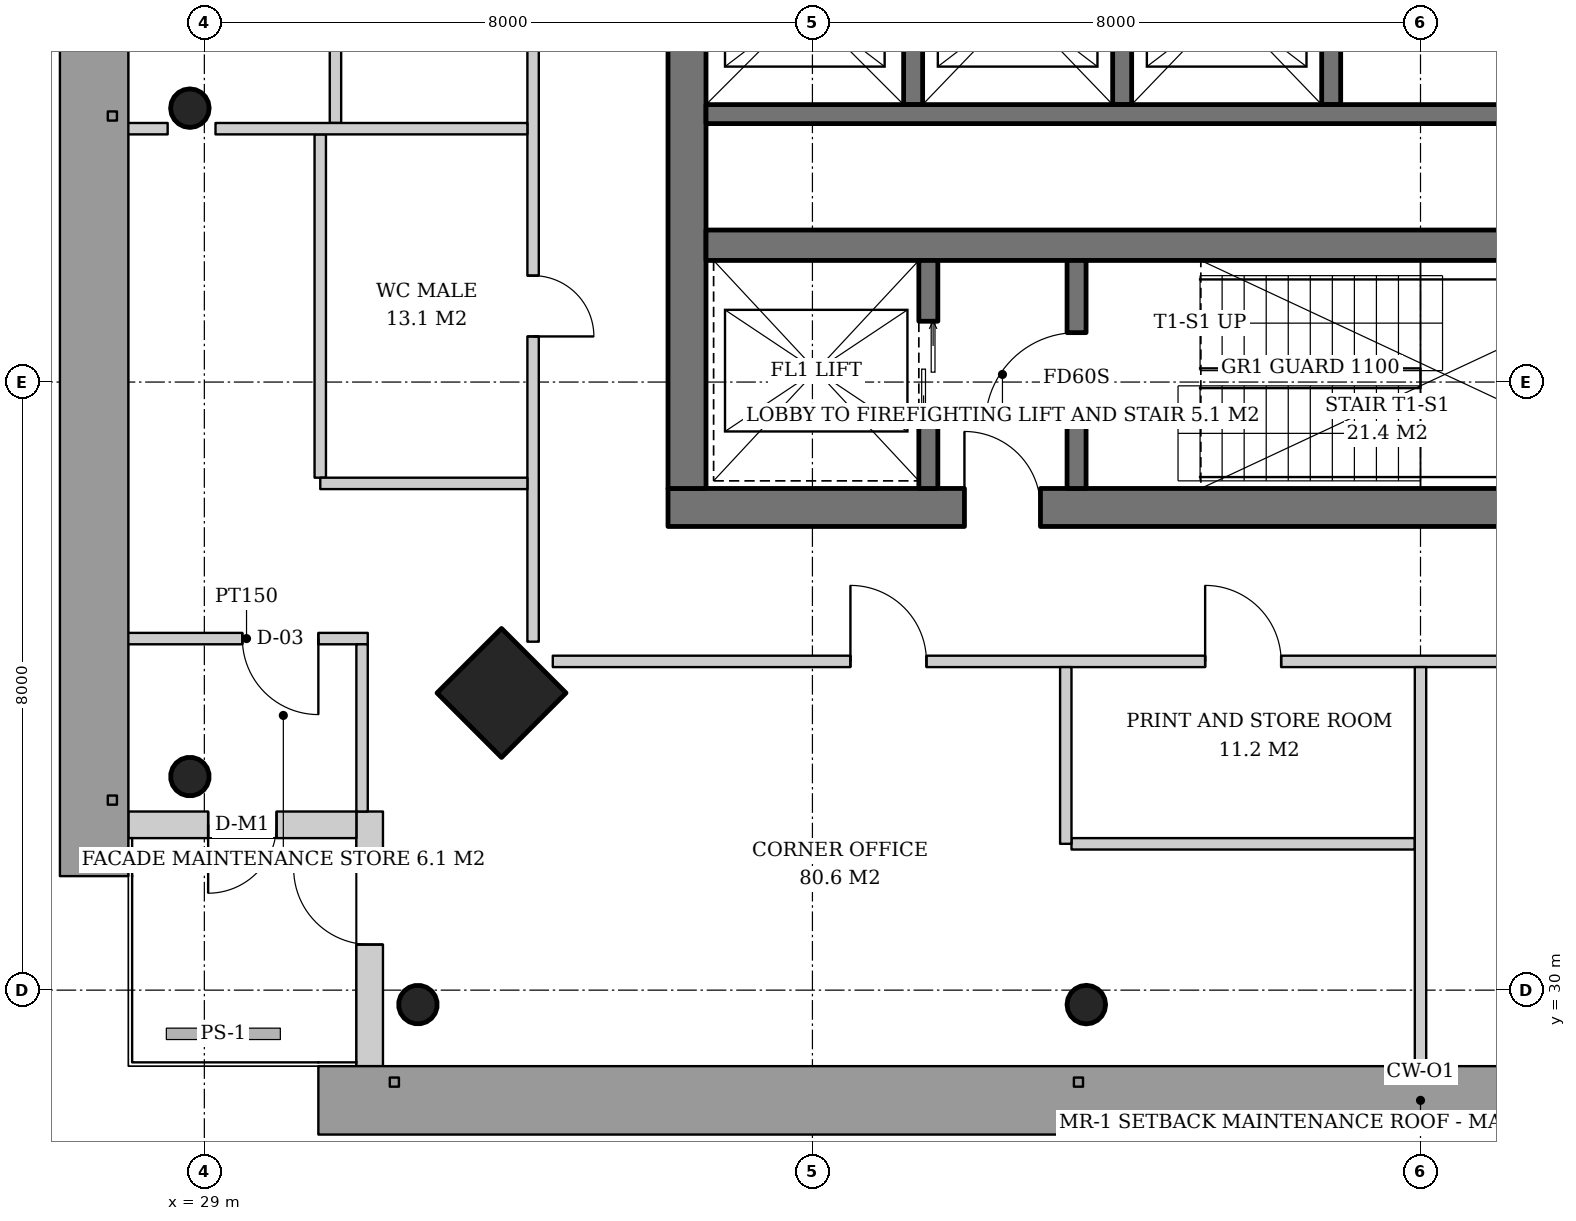
"""IFC4 building model, lengths in metres.
Left out: names, types, materials, properties, quantities, classifications, styles, units other than length and angle.
Written with IfcOpenShell. Run it as: python <this file> out.ifc"""

import sys

from ifc_helpers import new_model, si_unit, direction, frame, frame_2d, origin, origin_2d, place, context, subcontext, project, spatial, rectangle, hollow_circle, extrude, element, fill, save


model = new_model("IFC4")
c1 = context("Model", 3, precision=1e-05, world=origin(), true_north=direction((0.0, 1.0)))
c2 = subcontext(c1, "Body", "Model", "MODEL_VIEW")
j1 = project(units=[si_unit("LENGTHUNIT", "METRE"), si_unit("PLANEANGLEUNIT", "RADIAN")], contexts=[c1])
p1 = place(None, origin())
s1 = spatial("IfcSite", under=j1, at=p1, CompositionType="ELEMENT")
p2 = place(p1, origin())
s2 = spatial("IfcBuilding", under=s1, at=p2, CompositionType="ELEMENT")
p3 = place(p2, frame((0.0, 0.0, 264.2)))
s3 = spatial("IfcBuildingStorey", under=s2, at=p3, CompositionType="ELEMENT", Elevation=264.2)
p4 = place(p3, frame((32.871, 33.871, 0.0), z_axis=(0.031962158256, 0.031962158256, 0.998977898093), x_axis=(-0.707106781187, 0.707106781187, 0.0)))
e1 = element("IfcColumn", 1, at=p4, inside=s3, PredefinedType="COLUMN", context=c2, shape_type="SweptSolid", body=[
    extrude(rectangle(XDim=1.2, YDim=1.2, at=origin_2d()), origin(), (0.0, 0.0, 1.0), 3.804),
])
p5 = place(p3, frame((28.771, 32.771, 0.0), z_axis=(0.031898107953, 0.031898107953, 0.998981992539), x_axis=(-0.707106781187, 0.707106781187, 0.0)))
e2 = element("IfcColumn", 2, at=p5, inside=s3, PredefinedType="COLUMN", context=c2, shape_type="SweptSolid", body=[
    extrude(hollow_circle(Radius=0.254, WallThickness=0.02, at=origin_2d()), origin(), (0.0, 0.0, 1.0), 3.804),
])
p6 = place(p3, frame((28.771, 41.591, 0.0), z_axis=(0.031912557129, 0.010594712125, 0.999434510497), x_axis=(-0.315081783451, 0.949064523485, 0.0)))
e3 = element("IfcColumn", 3, at=p6, inside=s3, PredefinedType="COLUMN", context=c2, shape_type="SweptSolid", body=[
    extrude(hollow_circle(Radius=0.254, WallThickness=0.02, at=origin_2d()), origin(), (0.0, 0.0, 1.0), 3.802),
])
p7 = place(p3, frame((31.771, 29.771, 0.0), z_axis=(0.031898107953, 0.031898107953, 0.998981992539), x_axis=(-0.707106781187, 0.707106781187, 0.0)))
e4 = element("IfcColumn", 4, at=p7, inside=s3, PredefinedType="COLUMN", context=c2, shape_type="SweptSolid", body=[
    extrude(hollow_circle(Radius=0.254, WallThickness=0.02, at=origin_2d()), origin(), (0.0, 0.0, 1.0), 3.804),
])
p8 = place(p3, frame((40.591, 29.771, 0.0), z_axis=(0.010594712125, 0.031912557129, 0.999434510497), x_axis=(-0.949064523485, 0.315081783451, 0.0)))
e5 = element("IfcColumn", 5, at=p8, inside=s3, PredefinedType="COLUMN", context=c2, shape_type="SweptSolid", body=[
    extrude(hollow_circle(Radius=0.254, WallThickness=0.02, at=origin_2d()), origin(), (0.0, 0.0, 1.0), 3.802),
])
p9 = place(p3, frame((35.1, 36.35, 0.0), z_axis=(0.0, 0.0, 1.0), x_axis=(1.0, 0.0, 0.0)))
e6 = element("IfcWall", 6, at=p9, inside=s3, PredefinedType="SHEAR", context=c2, shape_type="SweptSolid", body=[
    extrude(rectangle(XDim=19.8, YDim=0.5, at=frame_2d((9.9, 0.0))), origin(), (0.0, 0.0, 1.0), 3.8),
])
p10 = place(p9, frame((3.9, 0.0, 0.0)))
e7 = element("IfcOpeningElement", 7, at=p10, cuts=e6, PredefinedType="OPENING", context=c2, shape_type="SweptSolid", body=[
    extrude(rectangle(XDim=1.0, YDim=2.1, at=frame_2d((0.5, 1.05))), frame((0.0, 0.26, 0.0), z_axis=(0.0, -1.0, 0.0), x_axis=(1.0, 0.0, 0.0)), (0.0, 0.0, 1.0), 0.52),
])
p11 = place(p9, frame((15.35, 0.0, 0.0)))
e8 = element("IfcOpeningElement", 8, at=p11, cuts=e6, PredefinedType="OPENING", context=c2, shape_type="SweptSolid", body=[
    extrude(rectangle(XDim=1.0, YDim=2.1, at=frame_2d((0.5, 1.05))), frame((0.0, 0.26, 0.0), z_axis=(0.0, -1.0, 0.0), x_axis=(1.0, 0.0, 0.0)), (0.0, 0.0, 1.0), 0.52),
])
p12 = place(p3, frame((35.35, 36.6, 0.0), z_axis=(0.0, 0.0, 1.0), x_axis=(0.0, 1.0, 0.0)))
e9 = element("IfcWall", 9, at=p12, inside=s3, PredefinedType="SHEAR", context=c2, shape_type="SweptSolid", body=[
    extrude(rectangle(XDim=18.8, YDim=0.5, at=frame_2d((9.4, 0.0))), origin(), (0.0, 0.0, 1.0), 3.8),
])
p13 = place(p12, frame((8.5, 0.0, 0.0)))
e10 = element("IfcOpeningElement", 10, at=p13, cuts=e9, PredefinedType="OPENING", context=c2, shape_type="SweptSolid", body=[
    extrude(rectangle(XDim=1.8, YDim=2.4, at=frame_2d((0.9, 1.2))), frame((0.0, 0.26, 0.0), z_axis=(0.0, -1.0, 0.0), x_axis=(1.0, 0.0, 0.0)), (0.0, 0.0, 1.0), 0.52),
])
p14 = place(p3, frame((35.6, 39.8, 0.0), z_axis=(0.0, 0.0, 1.0), x_axis=(1.0, 0.0, 0.0)))
e11 = element("IfcWall", 11, at=p14, inside=s3, PredefinedType="SHEAR", context=c2, shape_type="SweptSolid", body=[
    extrude(rectangle(XDim=18.8, YDim=0.4, at=frame_2d((9.4, 0.0))), origin(), (0.0, 0.0, 1.0), 3.8),
])
p15 = place(p3, frame((31.175, 29.0, 0.0), z_axis=(0.0, 0.0, 1.0), x_axis=(0.0, 1.0, 0.0)))
e12 = element("IfcWall", 12, at=p15, inside=s3, PredefinedType="SOLIDWALL", context=c2, shape_type="SweptSolid", body=[
    extrude(rectangle(XDim=3.35, YDim=0.35, at=frame_2d((1.675, 0.0))), origin(), (0.0, 0.0, 1.0), 3.62),
])
p16 = place(p15, frame((1.6, 0.0, 0.0)))
e13 = element("IfcOpeningElement", 13, at=p16, cuts=e12, PredefinedType="OPENING", context=c2, shape_type="SweptSolid", body=[
    extrude(rectangle(XDim=1.0, YDim=2.4, at=frame_2d((0.5, 1.2))), frame((0.0, 0.185, 0.0), z_axis=(0.0, -1.0, 0.0), x_axis=(1.0, 0.0, 0.0)), (0.0, 0.0, 1.0), 0.37),
])
p17 = place(p3, frame((31.0, 32.175, 0.0), z_axis=(0.0, 0.0, 1.0), x_axis=(-1.0, 0.0, 0.0)))
e14 = element("IfcWall", 14, at=p17, inside=s3, PredefinedType="SOLIDWALL", context=c2, shape_type="SweptSolid", body=[
    extrude(rectangle(XDim=3.0, YDim=0.35, at=frame_2d((1.5, 0.0))), origin(), (0.0, 0.0, 1.0), 3.62),
])
p18 = place(p17, frame((1.05, 0.0, 0.0)))
e15 = element("IfcOpeningElement", 15, at=p18, cuts=e14, PredefinedType="OPENING", context=c2, shape_type="SweptSolid", body=[
    extrude(rectangle(XDim=0.9, YDim=2.1, at=frame_2d((0.45, 1.05))), frame((0.0, 0.185, 0.0), z_axis=(0.0, -1.0, 0.0), x_axis=(1.0, 0.0, 0.0)), (0.0, 0.0, 1.0), 0.37),
])
p19 = place(p3, frame((38.525, 36.6, 0.0), z_axis=(0.0, 0.0, 1.0), x_axis=(0.0, 1.0, 0.0)))
e16 = element("IfcWall", 16, at=p19, inside=s3, PredefinedType="SHEAR", context=c2, shape_type="SweptSolid", body=[
    extrude(rectangle(XDim=3.0, YDim=0.25, at=frame_2d((1.5, 0.0))), origin(), (0.0, 0.0, 1.0), 3.8),
])
p20 = place(p19, frame((0.9, 0.0, 0.0)))
e17 = element("IfcOpeningElement", 17, at=p20, cuts=e16, PredefinedType="OPENING", context=c2, shape_type="SweptSolid", body=[
    extrude(rectangle(XDim=1.3, YDim=2.2, at=frame_2d((0.65, 1.1))), frame((0.0, 0.135, 0.0), z_axis=(0.0, -1.0, 0.0), x_axis=(1.0, 0.0, 0.0)), (0.0, 0.0, 1.0), 0.27),
])
p21 = place(p3, frame((40.475, 36.6, 0.0), z_axis=(0.0, 0.0, 1.0), x_axis=(0.0, 1.0, 0.0)))
e18 = element("IfcWall", 18, at=p21, inside=s3, PredefinedType="SHEAR", context=c2, shape_type="SweptSolid", body=[
    extrude(rectangle(XDim=3.0, YDim=0.25, at=frame_2d((1.5, 0.0))), origin(), (0.0, 0.0, 1.0), 3.8),
])
p22 = place(p21, frame((0.85, 0.0, 0.0)))
e19 = element("IfcOpeningElement", 19, at=p22, cuts=e18, PredefinedType="OPENING", context=c2, shape_type="SweptSolid", body=[
    extrude(rectangle(XDim=1.2, YDim=2.1, at=frame_2d((0.6, 1.05))), frame((0.0, 0.135, 0.0), z_axis=(0.0, -1.0, 0.0), x_axis=(1.0, 0.0, 0.0)), (0.0, 0.0, 1.0), 0.27),
])
for number, where, z_axis, x_axis in (
    (20, (38.325, 44.25, 0.0), (0.0, 0.0, 1.0), (0.0, -1.0, 0.0)),
    (21, (41.075, 44.25, 0.0), (0.0, 0.0, 1.0), (0.0, -1.0, 0.0)),
    (22, (43.825, 44.25, 0.0), (0.0, 0.0, 1.0), (0.0, -1.0, 0.0)),
):
    element("IfcWall", number, at=place(p3, frame(where, z_axis=z_axis, x_axis=x_axis)), inside=s3, PredefinedType="SHEAR", context=c2, shape_type="SweptSolid", body=[
        extrude(rectangle(XDim=2.6, YDim=0.25, at=frame_2d((1.3, 0.0))), origin(), (0.0, 0.0, 1.0), 3.8),
    ])
p23 = place(p3, frame((35.6, 41.525, 0.0), z_axis=(0.0, 0.0, 1.0), x_axis=(1.0, 0.0, 0.0)))
e23 = element("IfcWall", 23, at=p23, inside=s3, PredefinedType="SHEAR", context=c2, shape_type="SweptSolid", body=[
    extrude(rectangle(XDim=11.1, YDim=0.25, at=frame_2d((5.55, 0.0))), origin(), (0.0, 0.0, 1.0), 3.8),
])
for number, where, z_axis, x_axis in (
    (24, (30.725, 45.925, 0.0), (0.0, 0.0, 1.0), (0.0, -1.0, 0.0)),
    (25, (30.525, 41.258, 0.0), (0.0, 0.0, 1.0), (0.0, -1.0, 0.0)),
):
    element("IfcWall", number, at=place(p3, frame(where, z_axis=z_axis, x_axis=x_axis)), inside=s3, PredefinedType="PARTITIONING", context=c2, shape_type="SweptSolid", body=[
        extrude(rectangle(XDim=4.517, YDim=0.15, at=frame_2d((2.258, 0.0))), origin(), (0.0, 0.0, 1.0), 3.12),
    ])
p24 = place(p3, frame((33.325, 57.416, 0.0), z_axis=(0.0, 0.0, 1.0), x_axis=(0.0, -1.0, 0.0)))
e26 = element("IfcWall", 26, at=p24, inside=s3, PredefinedType="PARTITIONING", context=c2, shape_type="SweptSolid", body=[
    extrude(rectangle(XDim=22.832, YDim=0.15, at=frame_2d((11.416, 0.0))), origin(), (0.0, 0.0, 1.0), 3.02),
])
p25 = place(p24, frame((3.916, 0.0, 0.0)))
e27 = element("IfcOpeningElement", 27, at=p25, cuts=e26, PredefinedType="OPENING", context=c2, shape_type="SweptSolid", body=[
    extrude(rectangle(XDim=1.0, YDim=2.1, at=frame_2d((0.5, 1.05))), frame((0.0, 0.085, 0.0), z_axis=(0.0, -1.0, 0.0), x_axis=(1.0, 0.0, 0.0)), (0.0, 0.0, 1.0), 0.17),
])
p26 = place(p24, frame((8.682, 0.0, 0.0)))
e28 = element("IfcOpeningElement", 28, at=p26, cuts=e26, PredefinedType="OPENING", context=c2, shape_type="SweptSolid", body=[
    extrude(rectangle(XDim=0.8, YDim=2.1, at=frame_2d((0.4, 1.05))), frame((0.0, 0.085, 0.0), z_axis=(0.0, -1.0, 0.0), x_axis=(1.0, 0.0, 0.0)), (0.0, 0.0, 1.0), 0.17),
])
p27 = place(p24, frame((13.249, 0.0, 0.0)))
e29 = element("IfcOpeningElement", 29, at=p27, cuts=e26, PredefinedType="OPENING", context=c2, shape_type="SweptSolid", body=[
    extrude(rectangle(XDim=1.0, YDim=2.1, at=frame_2d((0.5, 1.05))), frame((0.0, 0.085, 0.0), z_axis=(0.0, -1.0, 0.0), x_axis=(1.0, 0.0, 0.0)), (0.0, 0.0, 1.0), 0.17),
])
p28 = place(p24, frame((18.016, 0.0, 0.0)))
e30 = element("IfcOpeningElement", 30, at=p28, cuts=e26, PredefinedType="OPENING", context=c2, shape_type="SweptSolid", body=[
    extrude(rectangle(XDim=0.8, YDim=2.1, at=frame_2d((0.4, 1.05))), frame((0.0, 0.085, 0.0), z_axis=(0.0, -1.0, 0.0), x_axis=(1.0, 0.0, 0.0)), (0.0, 0.0, 1.0), 0.17),
])
p29 = place(p3, frame((33.25, 41.333, 0.0), z_axis=(0.0, 0.0, 1.0), x_axis=(-1.0, 0.0, 0.0)))
e31 = element("IfcWall", 31, at=p29, inside=s3, PredefinedType="PARTITIONING", context=c2, shape_type="SweptSolid", body=[
    extrude(rectangle(XDim=4.103, YDim=0.15, at=frame_2d((2.052, 0.0))), origin(), (0.0, 0.0, 1.0), 3.62),
])
p30 = place(p3, frame((28.517, 41.333, 0.0), z_axis=(0.0, 0.0, 1.0), x_axis=(-1.0, 0.0, 0.0)))
e32 = element("IfcWall", 32, at=p30, inside=s3, PredefinedType="PARTITIONING", context=c2, shape_type="SweptSolid", body=[
    extrude(rectangle(XDim=0.557, YDim=0.15, at=frame_2d((0.279, 0.0))), origin(), (0.0, 0.0, 1.0), 3.62),
])
p31 = place(p3, frame((33.25, 36.667, 0.0), z_axis=(0.0, 0.0, 1.0), x_axis=(-1.0, 0.0, 0.0)))
e33 = element("IfcWall", 33, at=p31, inside=s3, PredefinedType="PARTITIONING", context=c2, shape_type="SweptSolid", body=[
    extrude(rectangle(XDim=2.725, YDim=0.15, at=frame_2d((1.363, 0.0))), origin(), (0.0, 0.0, 1.0), 3.62),
])
p32 = place(p3, frame((40.408, 31.925, 0.0), z_axis=(0.0, 0.0, 1.0), x_axis=(1.0, 0.0, 0.0)))
e34 = element("IfcWall", 34, at=p32, inside=s3, PredefinedType="PARTITIONING", context=c2, shape_type="SweptSolid", body=[
    extrude(rectangle(XDim=4.517, YDim=0.15, at=frame_2d((2.258, 0.0))), origin(), (0.0, 0.0, 1.0), 3.12),
])
p33 = place(p3, frame((33.584, 34.325, 0.0), z_axis=(0.0, 0.0, 1.0), x_axis=(1.0, 0.0, 0.0)))
e35 = element("IfcWall", 35, at=p33, inside=s3, PredefinedType="PARTITIONING", context=c2, shape_type="SweptSolid", body=[
    extrude(rectangle(XDim=22.832, YDim=0.15, at=frame_2d((11.416, 0.0))), origin(), (0.0, 0.0, 1.0), 3.02),
])
p34 = place(p33, frame((3.916, 0.0, 0.0)))
e36 = element("IfcOpeningElement", 36, at=p34, cuts=e35, PredefinedType="OPENING", context=c2, shape_type="SweptSolid", body=[
    extrude(rectangle(XDim=1.0, YDim=2.1, at=frame_2d((0.5, 1.05))), frame((0.0, 0.085, 0.0), z_axis=(0.0, -1.0, 0.0), x_axis=(1.0, 0.0, 0.0)), (0.0, 0.0, 1.0), 0.17),
])
p35 = place(p33, frame((8.583, 0.0, 0.0)))
e37 = element("IfcOpeningElement", 37, at=p35, cuts=e35, PredefinedType="OPENING", context=c2, shape_type="SweptSolid", body=[
    extrude(rectangle(XDim=1.0, YDim=2.1, at=frame_2d((0.5, 1.05))), frame((0.0, 0.085, 0.0), z_axis=(0.0, -1.0, 0.0), x_axis=(1.0, 0.0, 0.0)), (0.0, 0.0, 1.0), 0.17),
])
p36 = place(p33, frame((13.249, 0.0, 0.0)))
e38 = element("IfcOpeningElement", 38, at=p36, cuts=e35, PredefinedType="OPENING", context=c2, shape_type="SweptSolid", body=[
    extrude(rectangle(XDim=1.0, YDim=2.1, at=frame_2d((0.5, 1.05))), frame((0.0, 0.085, 0.0), z_axis=(0.0, -1.0, 0.0), x_axis=(1.0, 0.0, 0.0)), (0.0, 0.0, 1.0), 0.17),
])
p37 = place(p3, frame((40.333, 34.25, 0.0), z_axis=(0.0, 0.0, 1.0), x_axis=(0.0, -1.0, 0.0)))
e39 = element("IfcWall", 39, at=p37, inside=s3, PredefinedType="PARTITIONING", context=c2, shape_type="SweptSolid", body=[
    extrude(rectangle(XDim=2.325, YDim=0.15, at=frame_2d((1.163, 0.0))), origin(), (0.0, 0.0, 1.0), 3.62),
])
p38 = place(p3, frame((45.0, 34.25, 0.0), z_axis=(0.0, 0.0, 1.0), x_axis=(0.0, -1.0, 0.0)))
e40 = element("IfcWall", 40, at=p38, inside=s3, PredefinedType="PARTITIONING", context=c2, shape_type="SweptSolid", body=[
    extrude(rectangle(XDim=5.29, YDim=0.15, at=frame_2d((2.645, 0.0))), origin(), (0.0, 0.0, 1.0), 3.12),
])
p39 = place(p3, frame((31.15, 34.625, 0.0), z_axis=(0.0, 0.0, 1.0), x_axis=(-1.0, 0.0, 0.0)))
e41 = element("IfcWall", 41, at=p39, inside=s3, PredefinedType="PARTITIONING", context=c2, shape_type="SweptSolid", body=[
    extrude(rectangle(XDim=3.19, YDim=0.15, at=frame_2d((1.595, 0.0))), origin(), (0.0, 0.0, 1.0), 3.12),
])
p40 = place(p39, frame((0.65, 0.0, 0.0)))
e42 = element("IfcOpeningElement", 42, at=p40, cuts=e41, PredefinedType="OPENING", context=c2, shape_type="SweptSolid", body=[
    extrude(rectangle(XDim=1.0, YDim=2.1, at=frame_2d((0.5, 1.05))), frame((0.0, 0.085, 0.0), z_axis=(0.0, -1.0, 0.0), x_axis=(1.0, 0.0, 0.0)), (0.0, 0.0, 1.0), 0.17),
])
p41 = place(p3, frame((31.075, 34.55, 0.0), z_axis=(0.0, 0.0, 1.0), x_axis=(0.0, -1.0, 0.0)))
e43 = element("IfcWall", 43, at=p41, inside=s3, PredefinedType="PARTITIONING", context=c2, shape_type="SweptSolid", body=[
    extrude(rectangle(XDim=2.2, YDim=0.15, at=frame_2d((1.1, 0.0))), origin(), (0.0, 0.0, 1.0), 3.02),
])
p42 = place(p18, origin())
e44 = element("IfcDoor", 44, at=p42, inside=s3, OperationType="SINGLE_SWING_RIGHT", PredefinedType="DOOR", context=c2, shape_type="SweptSolid", body=[
    extrude(rectangle(XDim=0.9, YDim=2.1, at=frame_2d((0.45, 1.05))), frame((0.0, 0.025, 0.0), z_axis=(0.0, -1.0, 0.0), x_axis=(1.0, 0.0, 0.0)), (0.0, 0.0, 1.0), 0.05),
])
fill(e15, e44)
p43 = place(p16, origin())
e45 = element("IfcDoor", 45, at=p43, inside=s3, OperationType="SINGLE_SWING_RIGHT", PredefinedType="DOOR", context=c2, shape_type="SweptSolid", body=[
    extrude(rectangle(XDim=1.0, YDim=2.4, at=frame_2d((0.5, 1.2))), frame((0.0, 0.025, 0.0), z_axis=(0.0, -1.0, 0.0), x_axis=(1.0, 0.0, 0.0)), (0.0, 0.0, 1.0), 0.05),
])
fill(e13, e45)
p44 = place(p20, origin())
e46 = element("IfcDoor", 46, at=p44, inside=s3, OperationType="DOUBLE_DOOR_SLIDING", PredefinedType="DOOR", context=c2, shape_type="SweptSolid", body=[
    extrude(rectangle(XDim=1.3, YDim=2.2, at=frame_2d((0.65, 1.1))), frame((0.0, 0.025, 0.0), z_axis=(0.0, -1.0, 0.0), x_axis=(1.0, 0.0, 0.0)), (0.0, 0.0, 1.0), 0.05),
])
fill(e17, e46)
p45 = place(p22, origin())
e47 = element("IfcDoor", 47, at=p45, inside=s3, OperationType="SINGLE_SWING_LEFT", PredefinedType="DOOR", context=c2, shape_type="SweptSolid", body=[
    extrude(rectangle(XDim=1.2, YDim=2.1, at=frame_2d((0.6, 1.05))), frame((0.0, 0.025, 0.0), z_axis=(0.0, -1.0, 0.0), x_axis=(1.0, 0.0, 0.0)), (0.0, 0.0, 1.0), 0.05),
])
fill(e19, e47)
p46 = place(p10, origin())
e48 = element("IfcDoor", 48, at=p46, inside=s3, OperationType="SINGLE_SWING_LEFT", PredefinedType="DOOR", context=c2, shape_type="SweptSolid", body=[
    extrude(rectangle(XDim=1.0, YDim=2.1, at=frame_2d((0.5, 1.05))), frame((0.0, 0.025, 0.0), z_axis=(0.0, -1.0, 0.0), x_axis=(1.0, 0.0, 0.0)), (0.0, 0.0, 1.0), 0.05),
])
fill(e7, e48)
p47 = place(p28, origin())
e49 = element("IfcDoor", 49, at=p47, inside=s3, OperationType="SINGLE_SWING_RIGHT", PredefinedType="DOOR", context=c2, shape_type="SweptSolid", body=[
    extrude(rectangle(XDim=0.8, YDim=2.1, at=frame_2d((0.4, 1.05))), frame((0.0, 0.025, 0.0), z_axis=(0.0, -1.0, 0.0), x_axis=(1.0, 0.0, 0.0)), (0.0, 0.0, 1.0), 0.05),
])
fill(e30, e49)
p48 = place(p34, origin())
e50 = element("IfcDoor", 50, at=p48, inside=s3, OperationType="SINGLE_SWING_LEFT", PredefinedType="DOOR", context=c2, shape_type="SweptSolid", body=[
    extrude(rectangle(XDim=1.0, YDim=2.1, at=frame_2d((0.5, 1.05))), frame((0.0, 0.025, 0.0), z_axis=(0.0, -1.0, 0.0), x_axis=(1.0, 0.0, 0.0)), (0.0, 0.0, 1.0), 0.05),
])
fill(e36, e50)
p49 = place(p35, origin())
e51 = element("IfcDoor", 51, at=p49, inside=s3, OperationType="SINGLE_SWING_LEFT", PredefinedType="DOOR", context=c2, shape_type="SweptSolid", body=[
    extrude(rectangle(XDim=1.0, YDim=2.1, at=frame_2d((0.5, 1.05))), frame((0.0, 0.025, 0.0), z_axis=(0.0, -1.0, 0.0), x_axis=(1.0, 0.0, 0.0)), (0.0, 0.0, 1.0), 0.05),
])
fill(e37, e51)
p50 = place(p40, origin())
e52 = element("IfcDoor", 52, at=p50, inside=s3, OperationType="SINGLE_SWING_LEFT", PredefinedType="DOOR", context=c2, shape_type="SweptSolid", body=[
    extrude(rectangle(XDim=1.0, YDim=2.1, at=frame_2d((0.5, 1.05))), frame((0.0, 0.025, 0.0), z_axis=(0.0, -1.0, 0.0), x_axis=(1.0, 0.0, 0.0)), (0.0, 0.0, 1.0), 0.05),
])
fill(e42, e52)
save(model, sys.argv[1])
